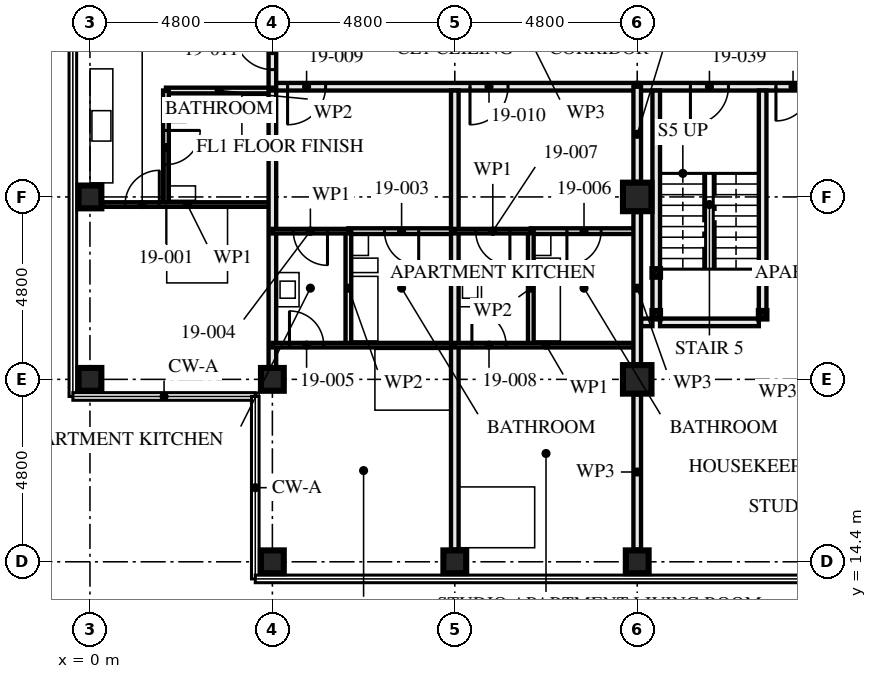
"""IFC4 building model, lengths in metres.
Left out: names, types, materials, properties, quantities, classifications, styles, units other than length and angle.
Written with IfcOpenShell. Run it as: python <this file> out.ifc"""

import sys

from ifc_helpers import new_model, si_unit, direction, frame, frame_2d, origin, origin_2d, place, context, subcontext, project, spatial, rectangle, hollow_rectangle, extrude, element, fill, save


model = new_model("IFC4")
c1 = context("Model", 3, precision=1e-05, world=origin(), true_north=direction((0.0, 1.0)))
c2 = subcontext(c1, "Body", "Model", "MODEL_VIEW")
j1 = project(units=[si_unit("LENGTHUNIT", "METRE"), si_unit("PLANEANGLEUNIT", "RADIAN")], contexts=[c1])
p1 = place(None, origin())
s1 = spatial("IfcSite", under=j1, at=p1, CompositionType="ELEMENT")
p2 = place(p1, origin())
s2 = spatial("IfcBuilding", under=s1, at=p2, CompositionType="ELEMENT")
p3 = place(p2, frame((0.0, 0.0, 72.5)))
s3 = spatial("IfcBuildingStorey", under=s2, at=p3, CompositionType="ELEMENT", Elevation=72.5)
for number, where, z_axis, x_axis in (
    (1, (0.0, 19.2, 0.0), (0.0, 0.0, 1.0), (0.0, 1.0, 0.0)),
    (2, (0.0, 24.0, 0.0), (0.0, 0.0, 1.0), (1.0, 0.0, 0.0)),
    (3, (4.8, 14.4, 0.0), (0.0, 0.0, 1.0), (0.0, 1.0, 0.0)),
    (4, (4.8, 19.2, 0.0), (0.0, 0.0, 1.0), (0.0, 1.0, 0.0)),
    (5, (9.6, 14.4, 0.0), (0.0, 0.0, 1.0), (0.0, 1.0, 0.0)),
    (6, (14.4, 14.4, 0.0), (0.0, 0.0, 1.0), (0.0, 1.0, 0.0)),
):
    element("IfcColumn", number, at=place(p3, frame(where, z_axis=z_axis, x_axis=x_axis)), inside=s3, PredefinedType="COLUMN", context=c2, shape_type="SweptSolid", body=[
        extrude(hollow_rectangle(XDim=0.6, YDim=0.6, WallThickness=0.08, at=origin_2d()), origin(), (0.0, 0.0, 1.0), 3.5),
    ])
for number, where, z_axis, x_axis in (
    (7, (14.4, 19.2, 0.0), (0.0, 0.0, 1.0), (1.0, 0.0, 0.0)),
    (8, (14.4, 24.0, 0.0), (0.0, 0.0, 1.0), (1.0, 0.0, 0.0)),
):
    element("IfcColumn", number, at=place(p3, frame(where, z_axis=z_axis, x_axis=x_axis)), inside=s3, PredefinedType="COLUMN", context=c2, shape_type="SweptSolid", body=[
        extrude(hollow_rectangle(XDim=0.75, YDim=0.75, WallThickness=0.08, at=origin_2d()), origin(), (0.0, 0.0, 1.0), 3.5),
    ])
for number, where, z_axis, x_axis in (
    (9, (14.9, 20.9, 0.0), (0.0, 0.0, 1.0), (1.0, 0.0, 0.0)),
    (10, (17.7, 20.9, 0.0), (0.0, 0.0, 1.0), (1.0, 0.0, 0.0)),
    (11, (14.9, 22.0, 0.0), (0.0, 0.0, 1.0), (1.0, 0.0, 0.0)),
    (12, (17.7, 22.0, 0.0), (0.0, 0.0, 1.0), (1.0, 0.0, 0.0)),
):
    element("IfcColumn", number, at=place(p3, frame(where, z_axis=z_axis, x_axis=x_axis)), inside=s3, PredefinedType="COLUMN", context=c2, shape_type="SweptSolid", body=[
        extrude(hollow_rectangle(XDim=0.2, YDim=0.2, WallThickness=0.008, at=origin_2d()), origin(), (0.0, 0.0, 1.0), 3.33),
    ])
p4 = place(p3, frame((2.0, 23.8, 0.0), z_axis=(0.0, 0.0, 1.0), x_axis=(0.0, 1.0, 0.0)))
e13 = element("IfcWall", 13, at=p4, inside=s3, PredefinedType="PARTITIONING", context=c2, shape_type="SweptSolid", body=[
    extrude(rectangle(XDim=3.0, YDim=0.15, at=frame_2d((1.5, 0.0))), origin(), (0.0, 0.0, 1.0), 2.55),
])
p5 = place(p4, frame((1.05, 0.0, 0.0)))
e14 = element("IfcOpeningElement", 14, at=p5, cuts=e13, PredefinedType="OPENING", context=c2, shape_type="SweptSolid", body=[
    extrude(rectangle(XDim=0.9, YDim=2.1, at=frame_2d((0.45, 1.05))), frame((0.0, 0.085, 0.0), z_axis=(0.0, -1.0, 0.0), x_axis=(1.0, 0.0, 0.0)), (0.0, 0.0, 1.0), 0.171),
])
p6 = place(p3, frame((2.0, 26.8, 0.0), z_axis=(0.0, 0.0, 1.0), x_axis=(1.0, 0.0, 0.0)))
e15 = element("IfcWall", 15, at=p6, inside=s3, PredefinedType="PARTITIONING", context=c2, shape_type="SweptSolid", body=[
    extrude(rectangle(XDim=2.8, YDim=0.15, at=frame_2d((1.4, 0.0))), origin(), (0.0, 0.0, 1.0), 3.33),
])
p7 = place(p3, frame((0.32, 23.8, 0.0), z_axis=(0.0, 0.0, 1.0), x_axis=(1.0, 0.0, 0.0)))
e16 = element("IfcWall", 16, at=p7, inside=s3, PredefinedType="PARTITIONING", context=c2, shape_type="SweptSolid", body=[
    extrude(rectangle(XDim=4.48, YDim=0.12, at=frame_2d((2.24, 0.0))), origin(), (0.0, 0.0, 1.0), 3.33),
])
p8 = place(p7, frame((0.605, 0.0, 0.0)))
e17 = element("IfcOpeningElement", 17, at=p8, cuts=e16, PredefinedType="OPENING", context=c2, shape_type="SweptSolid", body=[
    extrude(rectangle(XDim=0.9, YDim=2.1, at=frame_2d((0.45, 1.05))), frame((0.0, 0.071, 0.0), z_axis=(0.0, -1.0, 0.0), x_axis=(1.0, 0.0, 0.0)), (0.0, 0.0, 1.0), 0.141),
])
p9 = place(p3, frame((4.8, 19.52, 0.0), z_axis=(0.0, 0.0, 1.0), x_axis=(0.0, 1.0, 0.0)))
e18 = element("IfcWall", 18, at=p9, inside=s3, PredefinedType="PARTITIONING", context=c2, shape_type="SweptSolid", body=[
    extrude(rectangle(XDim=7.28, YDim=0.2, at=frame_2d((3.64, 0.0))), origin(), (0.0, 0.0, 1.0), 2.55),
])
p10 = place(p3, frame((6.8, 20.1, 0.0), z_axis=(0.0, 0.0, 1.0), x_axis=(0.0, 1.0, 0.0)))
e19 = element("IfcWall", 19, at=p10, inside=s3, PredefinedType="PARTITIONING", context=c2, shape_type="SweptSolid", body=[
    extrude(rectangle(XDim=3.0, YDim=0.15, at=frame_2d((1.5, 0.0))), origin(), (0.0, 0.0, 1.0), 3.33),
])
p11 = place(p3, frame((6.8, 23.1, 0.0), z_axis=(0.0, 0.0, 1.0), x_axis=(1.0, 0.0, 0.0)))
e20 = element("IfcWall", 20, at=p11, inside=s3, PredefinedType="PARTITIONING", context=c2, shape_type="SweptSolid", body=[
    extrude(rectangle(XDim=2.8, YDim=0.15, at=frame_2d((1.4, 0.0))), origin(), (0.0, 0.0, 1.0), 3.33),
])
p12 = place(p11, frame((0.95, 0.0, 0.0)))
e21 = element("IfcOpeningElement", 21, at=p12, cuts=e20, PredefinedType="OPENING", context=c2, shape_type="SweptSolid", body=[
    extrude(rectangle(XDim=0.9, YDim=2.1, at=frame_2d((0.45, 1.05))), frame((0.0, 0.085, 0.0), z_axis=(0.0, -1.0, 0.0), x_axis=(1.0, 0.0, 0.0)), (0.0, 0.0, 1.0), 0.171),
])
p13 = place(p3, frame((4.8, 23.1, 0.0), z_axis=(0.0, 0.0, 1.0), x_axis=(1.0, 0.0, 0.0)))
e22 = element("IfcWall", 22, at=p13, inside=s3, PredefinedType="PARTITIONING", context=c2, shape_type="SweptSolid", body=[
    extrude(rectangle(XDim=2.0, YDim=0.12, at=frame_2d((1.0, 0.0))), origin(), (0.0, 0.0, 1.0), 3.33),
])
p14 = place(p13, frame((0.55, 0.0, 0.0)))
e23 = element("IfcOpeningElement", 23, at=p14, cuts=e22, PredefinedType="OPENING", context=c2, shape_type="SweptSolid", body=[
    extrude(rectangle(XDim=0.9, YDim=2.1, at=frame_2d((0.45, 1.05))), frame((0.0, 0.071, 0.0), z_axis=(0.0, -1.0, 0.0), x_axis=(1.0, 0.0, 0.0)), (0.0, 0.0, 1.0), 0.141),
])
p15 = place(p3, frame((4.8, 20.1, 0.0), z_axis=(0.0, 0.0, 1.0), x_axis=(1.0, 0.0, 0.0)))
e24 = element("IfcWall", 24, at=p15, inside=s3, PredefinedType="PARTITIONING", context=c2, shape_type="SweptSolid", body=[
    extrude(rectangle(XDim=4.8, YDim=0.12, at=frame_2d((2.4, 0.0))), origin(), (0.0, 0.0, 1.0), 3.33),
])
p16 = place(p15, frame((0.45, 0.0, 0.0)))
e25 = element("IfcOpeningElement", 25, at=p16, cuts=e24, PredefinedType="OPENING", context=c2, shape_type="SweptSolid", body=[
    extrude(rectangle(XDim=0.9, YDim=2.1, at=frame_2d((0.45, 1.05))), frame((0.0, 0.071, 0.0), z_axis=(0.0, -1.0, 0.0), x_axis=(1.0, 0.0, 0.0)), (0.0, 0.0, 1.0), 0.141),
])
p17 = place(p3, frame((9.6, 14.72, 0.0), z_axis=(0.0, 0.0, 1.0), x_axis=(0.0, 1.0, 0.0)))
e26 = element("IfcWall", 26, at=p17, inside=s3, PredefinedType="PARTITIONING", context=c2, shape_type="SweptSolid", body=[
    extrude(rectangle(XDim=12.08, YDim=0.2, at=frame_2d((6.04, 0.0))), origin(), (0.0, 0.0, 1.0), 2.55),
])
p18 = place(p3, frame((11.6, 20.1, 0.0), z_axis=(0.0, 0.0, 1.0), x_axis=(0.0, 1.0, 0.0)))
e27 = element("IfcWall", 27, at=p18, inside=s3, PredefinedType="PARTITIONING", context=c2, shape_type="SweptSolid", body=[
    extrude(rectangle(XDim=3.0, YDim=0.15, at=frame_2d((1.5, 0.0))), origin(), (0.0, 0.0, 1.0), 3.33),
])
p19 = place(p3, frame((11.6, 23.1, 0.0), z_axis=(0.0, 0.0, 1.0), x_axis=(1.0, 0.0, 0.0)))
e28 = element("IfcWall", 28, at=p19, inside=s3, PredefinedType="PARTITIONING", context=c2, shape_type="SweptSolid", body=[
    extrude(rectangle(XDim=2.8, YDim=0.15, at=frame_2d((1.4, 0.0))), origin(), (0.0, 0.0, 1.0), 3.33),
])
p20 = place(p19, frame((0.95, 0.0, 0.0)))
e29 = element("IfcOpeningElement", 29, at=p20, cuts=e28, PredefinedType="OPENING", context=c2, shape_type="SweptSolid", body=[
    extrude(rectangle(XDim=0.9, YDim=2.1, at=frame_2d((0.45, 1.05))), frame((0.0, 0.085, 0.0), z_axis=(0.0, -1.0, 0.0), x_axis=(1.0, 0.0, 0.0)), (0.0, 0.0, 1.0), 0.171),
])
p21 = place(p3, frame((9.6, 23.1, 0.0), z_axis=(0.0, 0.0, 1.0), x_axis=(1.0, 0.0, 0.0)))
e30 = element("IfcWall", 30, at=p21, inside=s3, PredefinedType="PARTITIONING", context=c2, shape_type="SweptSolid", body=[
    extrude(rectangle(XDim=2.0, YDim=0.12, at=frame_2d((1.0, 0.0))), origin(), (0.0, 0.0, 1.0), 3.33),
])
p22 = place(p21, frame((0.55, 0.0, 0.0)))
e31 = element("IfcOpeningElement", 31, at=p22, cuts=e30, PredefinedType="OPENING", context=c2, shape_type="SweptSolid", body=[
    extrude(rectangle(XDim=0.9, YDim=2.1, at=frame_2d((0.45, 1.05))), frame((0.0, 0.071, 0.0), z_axis=(0.0, -1.0, 0.0), x_axis=(1.0, 0.0, 0.0)), (0.0, 0.0, 1.0), 0.141),
])
p23 = place(p3, frame((9.6, 20.1, 0.0), z_axis=(0.0, 0.0, 1.0), x_axis=(1.0, 0.0, 0.0)))
e32 = element("IfcWall", 32, at=p23, inside=s3, PredefinedType="PARTITIONING", context=c2, shape_type="SweptSolid", body=[
    extrude(rectangle(XDim=4.8, YDim=0.12, at=frame_2d((2.4, 0.0))), origin(), (0.0, 0.0, 1.0), 3.33),
])
p24 = place(p23, frame((0.45, 0.0, 0.0)))
e33 = element("IfcOpeningElement", 33, at=p24, cuts=e32, PredefinedType="OPENING", context=c2, shape_type="SweptSolid", body=[
    extrude(rectangle(XDim=0.9, YDim=2.1, at=frame_2d((0.45, 1.05))), frame((0.0, 0.071, 0.0), z_axis=(0.0, -1.0, 0.0), x_axis=(1.0, 0.0, 0.0)), (0.0, 0.0, 1.0), 0.141),
])
p25 = place(p3, frame((4.8, 26.9, 0.0), z_axis=(0.0, 0.0, 1.0), x_axis=(1.0, 0.0, 0.0)))
e34 = element("IfcWall", 34, at=p25, inside=s3, PredefinedType="PARTITIONING", context=c2, shape_type="SweptSolid", body=[
    extrude(rectangle(XDim=9.6, YDim=0.2, at=frame_2d((4.8, 0.0))), origin(), (0.0, 0.0, 1.0), 3.33),
])
p26 = place(p25, frame((0.4, 0.0, 0.0)))
e35 = element("IfcOpeningElement", 35, at=p26, cuts=e34, PredefinedType="OPENING", context=c2, shape_type="SweptSolid", body=[
    extrude(rectangle(XDim=1.0, YDim=2.1, at=frame_2d((0.5, 1.05))), frame((0.0, 0.111, 0.0), z_axis=(0.0, -1.0, 0.0), x_axis=(1.0, 0.0, 0.0)), (0.0, 0.0, 1.0), 0.221),
])
p27 = place(p25, frame((5.2, 0.0, 0.0)))
e36 = element("IfcOpeningElement", 36, at=p27, cuts=e34, PredefinedType="OPENING", context=c2, shape_type="SweptSolid", body=[
    extrude(rectangle(XDim=1.0, YDim=2.1, at=frame_2d((0.5, 1.05))), frame((0.0, 0.111, 0.0), z_axis=(0.0, -1.0, 0.0), x_axis=(1.0, 0.0, 0.0)), (0.0, 0.0, 1.0), 0.221),
])
p28 = place(p3, frame((4.8, 26.8, 0.0), z_axis=(0.0, 0.0, 1.0), x_axis=(0.0, 1.0, 0.0)))
e37 = element("IfcWall", 37, at=p28, inside=s3, PredefinedType="PARTITIONING", context=c2, shape_type="SweptSolid", body=[
    extrude(rectangle(XDim=1.605, YDim=0.2, at=frame_2d((0.802, 0.0))), origin(), (0.0, 0.0, 1.0), 3.33),
])
p29 = place(p28, frame((0.55, 0.0, 0.0)))
e38 = element("IfcOpeningElement", 38, at=p29, cuts=e37, PredefinedType="OPENING", context=c2, shape_type="SweptSolid", body=[
    extrude(rectangle(XDim=1.0, YDim=2.1, at=frame_2d((0.5, 1.05))), frame((0.0, 0.111, 0.0), z_axis=(0.0, -1.0, 0.0), x_axis=(1.0, 0.0, 0.0)), (0.0, 0.0, 1.0), 0.221),
])
p30 = place(p3, frame((14.9, 21.0, 0.0), z_axis=(0.0, 0.0, 1.0), x_axis=(0.0, 1.0, 0.0)))
e39 = element("IfcWall", 39, at=p30, inside=s3, PredefinedType="SOLIDWALL", context=c2, shape_type="SweptSolid", body=[
    extrude(rectangle(XDim=0.9, YDim=0.2, at=frame_2d((0.45, 0.0))), origin(), (0.0, 0.0, 1.0), 2.99),
])
p31 = place(p3, frame((14.9, 22.1, 0.0), z_axis=(0.0, 0.0, 1.0), x_axis=(0.0, 1.0, 0.0)))
e40 = element("IfcWall", 40, at=p31, inside=s3, PredefinedType="SOLIDWALL", context=c2, shape_type="SweptSolid", body=[
    extrude(rectangle(XDim=4.7, YDim=0.2, at=frame_2d((2.35, 0.0))), origin(), (0.0, 0.0, 1.0), 2.99),
])
p32 = place(p3, frame((17.7, 21.0, 0.0), z_axis=(0.0, 0.0, 1.0), x_axis=(0.0, 1.0, 0.0)))
e41 = element("IfcWall", 41, at=p32, inside=s3, PredefinedType="SOLIDWALL", context=c2, shape_type="SweptSolid", body=[
    extrude(rectangle(XDim=0.9, YDim=0.2, at=frame_2d((0.45, 0.0))), origin(), (0.0, 0.0, 1.0), 2.99),
])
p33 = place(p3, frame((17.7, 22.1, 0.0), z_axis=(0.0, 0.0, 1.0), x_axis=(0.0, 1.0, 0.0)))
e42 = element("IfcWall", 42, at=p33, inside=s3, PredefinedType="SOLIDWALL", context=c2, shape_type="SweptSolid", body=[
    extrude(rectangle(XDim=4.7, YDim=0.2, at=frame_2d((2.35, 0.0))), origin(), (0.0, 0.0, 1.0), 2.99),
])
p34 = place(p3, frame((14.5, 20.7, 0.0), z_axis=(0.0, 0.0, 1.0), x_axis=(1.0, 0.0, 0.0)))
e43 = element("IfcWall", 43, at=p34, inside=s3, PredefinedType="SOLIDWALL", context=c2, shape_type="SweptSolid", body=[
    extrude(rectangle(XDim=0.3, YDim=0.2, at=frame_2d((0.15, 0.0))), origin(), (0.0, 0.0, 1.0), 3.33),
])
p35 = place(p3, frame((15.0, 20.7, 0.0), z_axis=(0.0, 0.0, 1.0), x_axis=(1.0, 0.0, 0.0)))
e44 = element("IfcWall", 44, at=p35, inside=s3, PredefinedType="SOLIDWALL", context=c2, shape_type="SweptSolid", body=[
    extrude(rectangle(XDim=2.6, YDim=0.2, at=frame_2d((1.3, 0.0))), origin(), (0.0, 0.0, 1.0), 3.33),
])
p36 = place(p3, frame((14.4, 26.9, 0.0), z_axis=(0.0, 0.0, 1.0), x_axis=(1.0, 0.0, 0.0)))
e45 = element("IfcWall", 45, at=p36, inside=s3, PredefinedType="PARTITIONING", context=c2, shape_type="SweptSolid", body=[
    extrude(rectangle(XDim=14.4, YDim=0.2, at=frame_2d((7.2, 0.0))), origin(), (0.0, 0.0, 1.0), 2.55),
])
p37 = place(p36, frame((1.4, 0.0, 0.0)))
e46 = element("IfcOpeningElement", 46, at=p37, cuts=e45, PredefinedType="OPENING", context=c2, shape_type="SweptSolid", body=[
    extrude(rectangle(XDim=1.0, YDim=2.1, at=frame_2d((0.5, 1.05))), frame((0.0, 0.111, 0.0), z_axis=(0.0, -1.0, 0.0), x_axis=(1.0, 0.0, 0.0)), (0.0, 0.0, 1.0), 0.221),
])
p38 = place(p36, frame((3.65, 0.0, 0.0)))
e47 = element("IfcOpeningElement", 47, at=p38, cuts=e45, PredefinedType="OPENING", context=c2, shape_type="SweptSolid", body=[
    extrude(rectangle(XDim=0.9, YDim=2.1, at=frame_2d((0.45, 1.05))), frame((0.0, 0.111, 0.0), z_axis=(0.0, -1.0, 0.0), x_axis=(1.0, 0.0, 0.0)), (0.0, 0.0, 1.0), 0.221),
])
p39 = place(p36, frame((5.2, 0.0, 0.0)))
e48 = element("IfcOpeningElement", 48, at=p39, cuts=e45, PredefinedType="OPENING", context=c2, shape_type="SweptSolid", body=[
    extrude(rectangle(XDim=1.0, YDim=2.1, at=frame_2d((0.5, 1.05))), frame((0.0, 0.111, 0.0), z_axis=(0.0, -1.0, 0.0), x_axis=(1.0, 0.0, 0.0)), (0.0, 0.0, 1.0), 0.221),
])
p40 = place(p36, frame((10.0, 0.0, 0.0)))
e49 = element("IfcOpeningElement", 49, at=p40, cuts=e45, PredefinedType="OPENING", context=c2, shape_type="SweptSolid", body=[
    extrude(rectangle(XDim=1.0, YDim=2.1, at=frame_2d((0.5, 1.05))), frame((0.0, 0.111, 0.0), z_axis=(0.0, -1.0, 0.0), x_axis=(1.0, 0.0, 0.0)), (0.0, 0.0, 1.0), 0.221),
])
p41 = place(p3, frame((14.4, 14.72, 0.0), z_axis=(0.0, 0.0, 1.0), x_axis=(0.0, 1.0, 0.0)))
e50 = element("IfcWall", 50, at=p41, inside=s3, PredefinedType="PARTITIONING", context=c2, shape_type="SweptSolid", body=[
    extrude(rectangle(XDim=4.085, YDim=0.2, at=frame_2d((2.042, 0.0))), origin(), (0.0, 0.0, 1.0), 2.32),
])
p42 = place(p3, frame((14.4, 19.595, 0.0), z_axis=(0.0, 0.0, 1.0), x_axis=(0.0, 1.0, 0.0)))
e51 = element("IfcWall", 51, at=p42, inside=s3, PredefinedType="PARTITIONING", context=c2, shape_type="SweptSolid", body=[
    extrude(rectangle(XDim=4.01, YDim=0.2, at=frame_2d((2.005, 0.0))), origin(), (0.0, 0.0, 1.0), 2.32),
])
p43 = place(p3, frame((14.4, 24.395, 0.0), z_axis=(0.0, 0.0, 1.0), x_axis=(0.0, 1.0, 0.0)))
e52 = element("IfcWall", 52, at=p43, inside=s3, PredefinedType="PARTITIONING", context=c2, shape_type="SweptSolid", body=[
    extrude(rectangle(XDim=2.505, YDim=0.2, at=frame_2d((1.252, 0.0))), origin(), (0.0, 0.0, 1.0), 2.32),
])
p44 = place(p5, frame((0.9, 0.0, 0.0), z_axis=(0.0, 0.0, 1.0), x_axis=(-1.0, 0.0, 0.0)))
e53 = element("IfcDoor", 53, at=p44, inside=s3, OperationType="SINGLE_SWING_RIGHT", PredefinedType="DOOR", context=c2, shape_type="SweptSolid", body=[
    extrude(rectangle(XDim=0.9, YDim=2.1, at=frame_2d((0.45, 1.05))), frame((0.0, 0.022, 0.0), z_axis=(0.0, -1.0, 0.0), x_axis=(1.0, 0.0, 0.0)), (0.0, 0.0, 1.0), 0.044),
])
fill(e14, e53)
p45 = place(p8, origin())
e54 = element("IfcDoor", 54, at=p45, inside=s3, OperationType="SINGLE_SWING_LEFT", PredefinedType="DOOR", context=c2, shape_type="SweptSolid", body=[
    extrude(rectangle(XDim=0.9, YDim=2.1, at=frame_2d((0.45, 1.05))), frame((0.0, 0.022, 0.0), z_axis=(0.0, -1.0, 0.0), x_axis=(1.0, 0.0, 0.0)), (0.0, 0.0, 1.0), 0.044),
])
fill(e17, e54)
p46 = place(p12, frame((0.9, 0.0, 0.0), z_axis=(0.0, 0.0, 1.0), x_axis=(-1.0, 0.0, 0.0)))
e55 = element("IfcDoor", 55, at=p46, inside=s3, OperationType="SINGLE_SWING_RIGHT", PredefinedType="DOOR", context=c2, shape_type="SweptSolid", body=[
    extrude(rectangle(XDim=0.9, YDim=2.1, at=frame_2d((0.45, 1.05))), frame((0.0, 0.022, 0.0), z_axis=(0.0, -1.0, 0.0), x_axis=(1.0, 0.0, 0.0)), (0.0, 0.0, 1.0), 0.044),
])
fill(e21, e55)
p47 = place(p14, frame((0.9, 0.0, 0.0), z_axis=(0.0, 0.0, 1.0), x_axis=(-1.0, 0.0, 0.0)))
e56 = element("IfcDoor", 56, at=p47, inside=s3, OperationType="SINGLE_SWING_RIGHT", PredefinedType="DOOR", context=c2, shape_type="SweptSolid", body=[
    extrude(rectangle(XDim=0.9, YDim=2.1, at=frame_2d((0.45, 1.05))), frame((0.0, 0.022, 0.0), z_axis=(0.0, -1.0, 0.0), x_axis=(1.0, 0.0, 0.0)), (0.0, 0.0, 1.0), 0.044),
])
fill(e23, e56)
p48 = place(p16, origin())
e57 = element("IfcDoor", 57, at=p48, inside=s3, OperationType="SINGLE_SWING_RIGHT", PredefinedType="DOOR", context=c2, shape_type="SweptSolid", body=[
    extrude(rectangle(XDim=0.9, YDim=2.1, at=frame_2d((0.45, 1.05))), frame((0.0, 0.022, 0.0), z_axis=(0.0, -1.0, 0.0), x_axis=(1.0, 0.0, 0.0)), (0.0, 0.0, 1.0), 0.044),
])
fill(e25, e57)
p49 = place(p20, frame((0.9, 0.0, 0.0), z_axis=(0.0, 0.0, 1.0), x_axis=(-1.0, 0.0, 0.0)))
e58 = element("IfcDoor", 58, at=p49, inside=s3, OperationType="SINGLE_SWING_LEFT", PredefinedType="DOOR", context=c2, shape_type="SweptSolid", body=[
    extrude(rectangle(XDim=0.9, YDim=2.1, at=frame_2d((0.45, 1.05))), frame((0.0, 0.022, 0.0), z_axis=(0.0, -1.0, 0.0), x_axis=(1.0, 0.0, 0.0)), (0.0, 0.0, 1.0), 0.044),
])
fill(e29, e58)
p50 = place(p22, frame((0.9, 0.0, 0.0), z_axis=(0.0, 0.0, 1.0), x_axis=(-1.0, 0.0, 0.0)))
e59 = element("IfcDoor", 59, at=p50, inside=s3, OperationType="SINGLE_SWING_RIGHT", PredefinedType="DOOR", context=c2, shape_type="SweptSolid", body=[
    extrude(rectangle(XDim=0.9, YDim=2.1, at=frame_2d((0.45, 1.05))), frame((0.0, 0.022, 0.0), z_axis=(0.0, -1.0, 0.0), x_axis=(1.0, 0.0, 0.0)), (0.0, 0.0, 1.0), 0.044),
])
fill(e31, e59)
p51 = place(p24, origin())
e60 = element("IfcDoor", 60, at=p51, inside=s3, OperationType="SINGLE_SWING_RIGHT", PredefinedType="DOOR", context=c2, shape_type="SweptSolid", body=[
    extrude(rectangle(XDim=0.9, YDim=2.1, at=frame_2d((0.45, 1.05))), frame((0.0, 0.022, 0.0), z_axis=(0.0, -1.0, 0.0), x_axis=(1.0, 0.0, 0.0)), (0.0, 0.0, 1.0), 0.044),
])
fill(e33, e60)
p52 = place(p26, frame((1.0, 0.0, 0.0), z_axis=(0.0, 0.0, 1.0), x_axis=(-1.0, 0.0, 0.0)))
e61 = element("IfcDoor", 61, at=p52, inside=s3, OperationType="SINGLE_SWING_LEFT", PredefinedType="DOOR", context=c2, shape_type="SweptSolid", body=[
    extrude(rectangle(XDim=1.0, YDim=2.1, at=frame_2d((0.5, 1.05))), frame((0.0, 0.027, 0.0), z_axis=(0.0, -1.0, 0.0), x_axis=(1.0, 0.0, 0.0)), (0.0, 0.0, 1.0), 0.054),
])
fill(e35, e61)
p53 = place(p27, frame((1.0, 0.0, 0.0), z_axis=(0.0, 0.0, 1.0), x_axis=(-1.0, 0.0, 0.0)))
e62 = element("IfcDoor", 62, at=p53, inside=s3, OperationType="SINGLE_SWING_LEFT", PredefinedType="DOOR", context=c2, shape_type="SweptSolid", body=[
    extrude(rectangle(XDim=1.0, YDim=2.1, at=frame_2d((0.5, 1.05))), frame((0.0, 0.027, 0.0), z_axis=(0.0, -1.0, 0.0), x_axis=(1.0, 0.0, 0.0)), (0.0, 0.0, 1.0), 0.054),
])
fill(e36, e62)
p54 = place(p29, origin())
e63 = element("IfcDoor", 63, at=p54, inside=s3, OperationType="SINGLE_SWING_LEFT", PredefinedType="DOOR", context=c2, shape_type="SweptSolid", body=[
    extrude(rectangle(XDim=1.0, YDim=2.1, at=frame_2d((0.5, 1.05))), frame((0.0, 0.027, 0.0), z_axis=(0.0, -1.0, 0.0), x_axis=(1.0, 0.0, 0.0)), (0.0, 0.0, 1.0), 0.054),
])
fill(e38, e63)
p55 = place(p37, frame((1.0, 0.0, 0.0), z_axis=(0.0, 0.0, 1.0), x_axis=(-1.0, 0.0, 0.0)))
e64 = element("IfcDoor", 64, at=p55, inside=s3, OperationType="SINGLE_SWING_LEFT", PredefinedType="DOOR", context=c2, shape_type="SweptSolid", body=[
    extrude(rectangle(XDim=1.0, YDim=2.1, at=frame_2d((0.5, 1.05))), frame((0.0, 0.032, 0.0), z_axis=(0.0, -1.0, 0.0), x_axis=(1.0, 0.0, 0.0)), (0.0, 0.0, 1.0), 0.064),
])
fill(e46, e64)
p56 = place(p38, frame((0.9, 0.0, 0.0), z_axis=(0.0, 0.0, 1.0), x_axis=(-1.0, 0.0, 0.0)))
e65 = element("IfcDoor", 65, at=p56, inside=s3, OperationType="SINGLE_SWING_LEFT", PredefinedType="DOOR", context=c2, shape_type="SweptSolid", body=[
    extrude(rectangle(XDim=0.9, YDim=2.1, at=frame_2d((0.45, 1.05))), frame((0.0, 0.027, 0.0), z_axis=(0.0, -1.0, 0.0), x_axis=(1.0, 0.0, 0.0)), (0.0, 0.0, 1.0), 0.054),
])
fill(e47, e65)
save(model, sys.argv[1])
